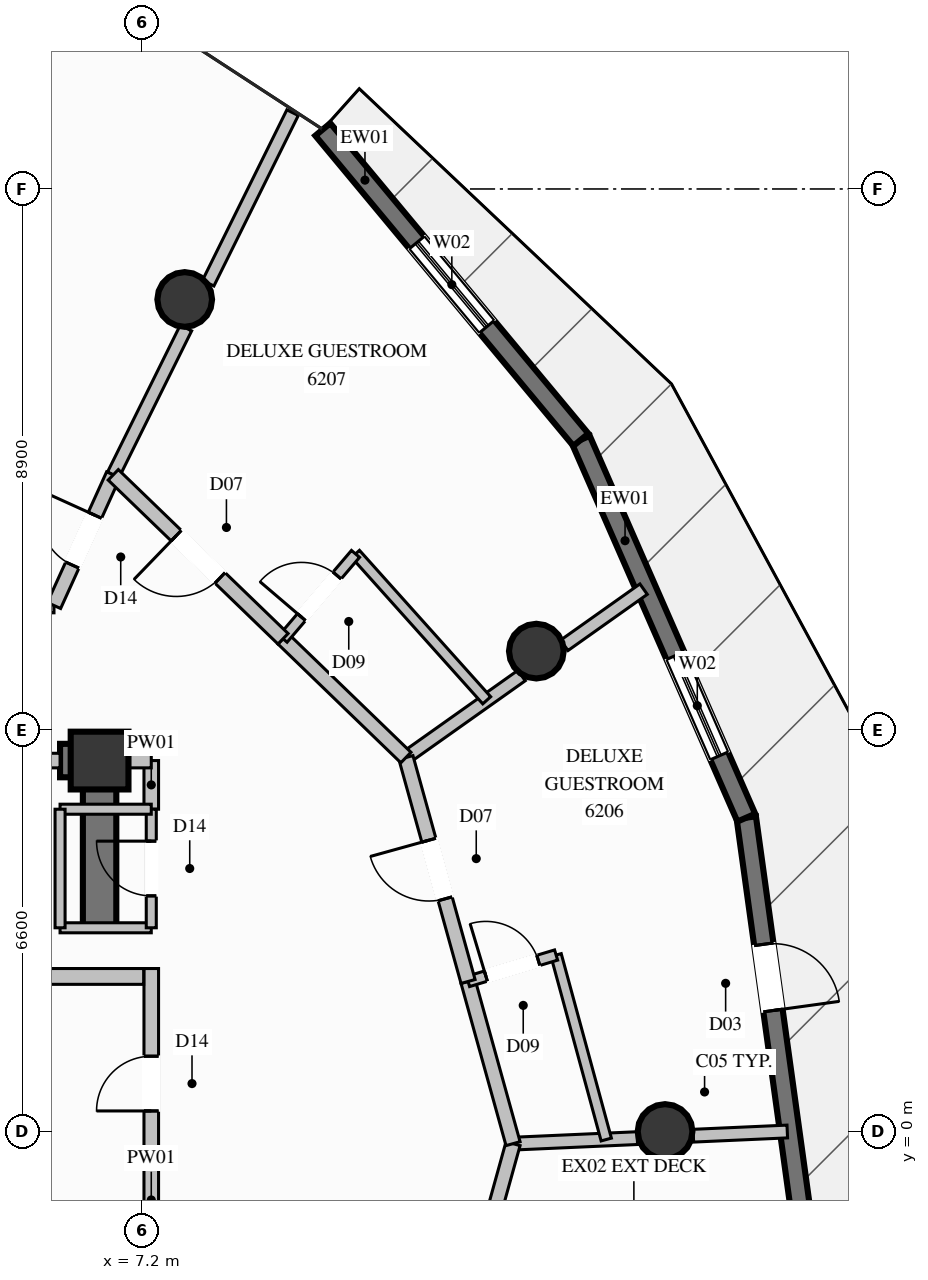
"""IFC4 building model, lengths in metres.
Left out: names, types, materials, properties, quantities, classifications, styles, units other than length and angle.
Written with IfcOpenShell. Run it as: python <this file> out.ifc"""

import sys

from ifc_helpers import new_model, si_unit, direction, frame, frame_2d, origin, origin_2d, place, context, subcontext, project, spatial, rectangle, circle, extrude, element, fill, save


model = new_model("IFC4")
c1 = context("Model", 3, precision=1e-05, world=origin(), true_north=direction((0.0, 1.0)))
c2 = subcontext(c1, "Body", "Model", "MODEL_VIEW")
j1 = project(units=[si_unit("LENGTHUNIT", "METRE"), si_unit("PLANEANGLEUNIT", "RADIAN")], contexts=[c1])
p1 = place(None, origin())
s1 = spatial("IfcSite", under=j1, at=p1, CompositionType="ELEMENT")
p2 = place(p1, origin())
s2 = spatial("IfcBuilding", under=s1, at=p2, CompositionType="ELEMENT")
p3 = place(p2, frame((0.0, 0.0, 230.8)))
s3 = spatial("IfcBuildingStorey", under=s2, at=p3, CompositionType="ELEMENT", Elevation=230.8)
p4 = place(p3, frame((6.5, 6.1, 0.0), z_axis=(0.0, 0.0, 1.0), x_axis=(1.0, 0.0, 0.0)))
e1 = element("IfcColumn", 1, at=p4, inside=s3, PredefinedType="COLUMN", context=c2, shape_type="SweptSolid", body=[
    extrude(rectangle(XDim=0.95, YDim=0.95, at=origin_2d()), origin(), (0.0, 0.0, 1.0), 3.6),
])
p5 = place(p3, frame((5.85, 6.1, 0.0), z_axis=(0.0, 0.0, 1.0), x_axis=(1.0, 0.0, 0.0)))
e2 = element("IfcWall", 2, at=p5, inside=s3, PredefinedType="SHEAR", context=c2, shape_type="SweptSolid", body=[
    extrude(rectangle(XDim=0.375, YDim=0.55, at=frame_2d((0.188, 0.0))), origin(), (0.0, 0.0, 1.0), 3.6),
])
p6 = place(p3, frame((6.5, 3.35, 0.0), z_axis=(0.0, 0.0, 1.0), x_axis=(0.0, 1.0, 0.0)))
e3 = element("IfcWall", 3, at=p6, inside=s3, PredefinedType="SHEAR", context=c2, shape_type="SweptSolid", body=[
    extrude(rectangle(XDim=3.025, YDim=0.55, at=frame_2d((1.512, 0.0))), origin(), (0.0, 0.0, 1.0), 3.6),
])
for number, where, z_axis, x_axis in (
    (4, (15.8, 0.0, 0.0), (0.0, 0.0, 1.0), (1.0, 0.0, 0.0)),
    (5, (13.683, 7.9, 0.0), (0.0, 0.0, 1.0), (1.0, 0.0, 0.0)),
    (6, (7.9, 13.683, 0.0), (0.0, 0.0, 1.0), (1.0, 0.0, 0.0)),
):
    element("IfcColumn", number, at=place(p3, frame(where, z_axis=z_axis, x_axis=x_axis)), inside=s3, PredefinedType="COLUMN", context=c2, shape_type="SweptSolid", body=[
        extrude(circle(Radius=0.45, at=origin_2d()), origin(), (0.0, 0.0, 1.0), 3.6),
    ])
p7 = place(p3, frame((17.136, 5.161, 0.0), z_axis=(0.0, 0.0, 1.0), x_axis=(0.137057460959, -0.990563098644, 0.0)))
e7 = element("IfcWall", 7, at=p7, inside=s3, PredefinedType="SOLIDWALL", context=c2, shape_type="SweptSolid", body=[
    extrude(rectangle(XDim=6.785, YDim=0.32, at=frame_2d((3.393, 0.0))), origin(), (0.0, 0.0, 1.0), 3.2),
])
p8 = place(p7, frame((2.102, 0.0, 0.0)))
e8 = element("IfcOpeningElement", 8, at=p8, cuts=e7, PredefinedType="OPENING", context=c2, shape_type="SweptSolid", body=[
    extrude(rectangle(XDim=1.1, YDim=2.2, at=frame_2d((0.55, 1.1))), frame((0.0, 0.17, 0.0), z_axis=(0.0, -1.0, 0.0), x_axis=(1.0, 0.0, 0.0)), (0.0, 0.0, 1.0), 0.34),
])
p9 = place(p3, frame((14.415, 11.376, 0.0), z_axis=(0.0, 0.0, 1.0), x_axis=(0.401047234641, -0.916057375707, 0.0)))
e9 = element("IfcWall", 9, at=p9, inside=s3, PredefinedType="SOLIDWALL", context=c2, shape_type="SweptSolid", body=[
    extrude(rectangle(XDim=6.785, YDim=0.32, at=frame_2d((3.392, 0.0))), origin(), (0.0, 0.0, 1.0), 3.2),
])
p10 = place(p9, frame((3.875, 0.0, 0.35)))
e10 = element("IfcOpeningElement", 10, at=p10, cuts=e9, PredefinedType="OPENING", context=c2, shape_type="SweptSolid", body=[
    extrude(rectangle(XDim=1.8, YDim=2.6, at=frame_2d((0.9, 1.3))), frame((0.0, 0.17, 0.0), z_axis=(0.0, -1.0, 0.0), x_axis=(1.0, 0.0, 0.0)), (0.0, 0.0, 1.0), 0.34),
])
p11 = place(p3, frame((10.171, 16.479, 0.0), z_axis=(0.0, 0.0, 1.0), x_axis=(0.639438786748, -0.76884201108, 0.0)))
e11 = element("IfcWall", 11, at=p11, inside=s3, PredefinedType="SOLIDWALL", context=c2, shape_type="SweptSolid", body=[
    extrude(rectangle(XDim=6.637, YDim=0.32, at=frame_2d((3.319, 0.0))), origin(), (0.0, 0.0, 1.0), 3.2),
])
p12 = place(p11, frame((2.419, 0.0, 0.35)))
e12 = element("IfcOpeningElement", 12, at=p12, cuts=e11, PredefinedType="OPENING", context=c2, shape_type="SweptSolid", body=[
    extrude(rectangle(XDim=1.8, YDim=2.6, at=frame_2d((0.9, 1.3))), frame((0.0, 0.17, 0.0), z_axis=(0.0, -1.0, 0.0), x_axis=(1.0, 0.0, 0.0)), (0.0, 0.0, 1.0), 0.34),
])
p13 = place(p3, frame((7.35, -2.34, 0.0), z_axis=(0.0, 0.0, 1.0), x_axis=(0.0, 1.0, 0.0)))
e13 = element("IfcWall", 13, at=p13, inside=s3, PredefinedType="PARTITIONING", context=c2, shape_type="SweptSolid", body=[
    extrude(rectangle(XDim=5.02, YDim=0.24, at=frame_2d((2.51, 0.0))), origin(), (0.0, 0.0, 1.0), 3.2),
])
p14 = place(p13, frame((2.678, 0.0, 0.0)))
e14 = element("IfcOpeningElement", 14, at=p14, cuts=e13, PredefinedType="OPENING", context=c2, shape_type="SweptSolid", body=[
    extrude(rectangle(XDim=0.9, YDim=2.02, at=frame_2d((0.45, 1.01))), frame((0.0, 0.13, 0.0), z_axis=(0.0, -1.0, 0.0), x_axis=(1.0, 0.0, 0.0)), (0.0, 0.0, 1.0), 0.26),
])
p15 = place(p3, frame((4.13, 2.55, 0.0), z_axis=(0.0, 0.0, 1.0), x_axis=(1.0, 0.0, 0.0)))
e15 = element("IfcWall", 15, at=p15, inside=s3, PredefinedType="PARTITIONING", context=c2, shape_type="SweptSolid", body=[
    extrude(rectangle(XDim=3.095, YDim=0.26, at=frame_2d((1.548, 0.0))), origin(), (0.0, 0.0, 1.0), 3.2),
])
p16 = place(p3, frame((-7.35, 8.65, 0.0), z_axis=(0.0, 0.0, 1.0), x_axis=(1.0, 0.0, 0.0)))
e16 = element("IfcWall", 16, at=p16, inside=s3, PredefinedType="PARTITIONING", context=c2, shape_type="SweptSolid", body=[
    extrude(rectangle(XDim=13.1, YDim=0.24, at=frame_2d((6.55, 0.0))), origin(), (0.0, 0.0, 1.0), 3.2),
])
p17 = place(p3, frame((3.0, 6.1, 0.0), z_axis=(0.0, 0.0, 1.0), x_axis=(1.0, 0.0, 0.0)))
e17 = element("IfcWall", 17, at=p17, inside=s3, PredefinedType="PARTITIONING", context=c2, shape_type="SweptSolid", body=[
    extrude(rectangle(XDim=2.85, YDim=0.24, at=frame_2d((1.425, 0.0))), origin(), (0.0, 0.0, 1.0), 2.067),
])
p18 = place(p3, frame((7.35, 5.3, 0.0), z_axis=(0.0, 0.0, 1.0), x_axis=(0.0, 1.0, 0.0)))
e18 = element("IfcWall", 18, at=p18, inside=s3, PredefinedType="PARTITIONING", context=c2, shape_type="SweptSolid", body=[
    extrude(rectangle(XDim=0.8, YDim=0.24, at=frame_2d((0.4, 0.0))), origin(), (0.0, 0.0, 1.0), 3.2),
])
p19 = place(p3, frame((6.5, 6.1, 0.0), z_axis=(0.0, 0.0, 1.0), x_axis=(1.0, 0.0, 0.0)))
e19 = element("IfcWall", 19, at=p19, inside=s3, PredefinedType="PARTITIONING", context=c2, shape_type="SweptSolid", body=[
    extrude(rectangle(XDim=0.85, YDim=0.24, at=frame_2d((0.425, 0.0))), origin(), (0.0, 0.0, 1.0), 3.2),
])
p20 = place(p3, frame((5.85, 3.35, 0.0), z_axis=(0.0, 0.0, 1.0), x_axis=(1.0, 0.0, 0.0)))
e20 = element("IfcWall", 20, at=p20, inside=s3, PredefinedType="PARTITIONING", context=c2, shape_type="SweptSolid", body=[
    extrude(rectangle(XDim=1.5, YDim=0.165, at=frame_2d((0.75, 0.0))), origin(), (0.0, 0.0, 1.0), 3.2),
])
p21 = place(p3, frame((7.35, 3.35, 0.0), z_axis=(0.0, 0.0, 1.0), x_axis=(0.0, 1.0, 0.0)))
e21 = element("IfcWall", 21, at=p21, inside=s3, PredefinedType="PARTITIONING", context=c2, shape_type="SweptSolid", body=[
    extrude(rectangle(XDim=1.95, YDim=0.165, at=frame_2d((0.975, 0.0))), origin(), (0.0, 0.0, 1.0), 3.2),
])
p22 = place(p21, frame((0.525, 0.0, 0.0)))
e22 = element("IfcOpeningElement", 22, at=p22, cuts=e21, PredefinedType="OPENING", context=c2, shape_type="SweptSolid", body=[
    extrude(rectangle(XDim=0.9, YDim=2.02, at=frame_2d((0.45, 1.01))), frame((0.0, 0.093, 0.0), z_axis=(0.0, -1.0, 0.0), x_axis=(1.0, 0.0, 0.0)), (0.0, 0.0, 1.0), 0.185),
])
p23 = place(p3, frame((7.35, 5.3, 0.0), z_axis=(0.0, 0.0, 1.0), x_axis=(-1.0, 0.0, 0.0)))
e23 = element("IfcWall", 23, at=p23, inside=s3, PredefinedType="PARTITIONING", context=c2, shape_type="SweptSolid", body=[
    extrude(rectangle(XDim=1.5, YDim=0.165, at=frame_2d((0.75, 0.0))), origin(), (0.0, 0.0, 1.0), 3.2),
])
p24 = place(p3, frame((5.85, 5.3, 0.0), z_axis=(0.0, 0.0, 1.0), x_axis=(0.0, -1.0, 0.0)))
e24 = element("IfcWall", 24, at=p24, inside=s3, PredefinedType="PARTITIONING", context=c2, shape_type="SweptSolid", body=[
    extrude(rectangle(XDim=1.95, YDim=0.165, at=frame_2d((0.975, 0.0))), origin(), (0.0, 0.0, 1.0), 2.067),
])
p25 = place(p3, frame((13.3, -0.2, 0.0), z_axis=(0.0, 0.0, 1.0), x_axis=(0.99900803182, 0.044530353235, 0.0)))
e25 = element("IfcWall", 25, at=p25, inside=s3, PredefinedType="PARTITIONING", context=c2, shape_type="SweptSolid", body=[
    extrude(rectangle(XDim=2.045, YDim=0.21, at=frame_2d((1.022, 0.0))), origin(), (0.0, 0.0, 1.0), 2.067),
])
p26 = place(p3, frame((16.265, -0.069, 0.0), z_axis=(0.0, 0.0, 1.0), x_axis=(0.99900178974, 0.04467017009, 0.0)))
e26 = element("IfcWall", 26, at=p26, inside=s3, PredefinedType="PARTITIONING", context=c2, shape_type="SweptSolid", body=[
    extrude(rectangle(XDim=1.547, YDim=0.21, at=frame_2d((0.773, 0.0))), origin(), (0.0, 0.0, 1.0), 3.2),
])
p27 = place(p3, frame((11.538, 6.15, 0.0), z_axis=(0.0, 0.0, 1.0), x_axis=(0.815822726153, 0.578302065959, 0.0)))
e27 = element("IfcWall", 27, at=p27, inside=s3, PredefinedType="PARTITIONING", context=c2, shape_type="SweptSolid", body=[
    extrude(rectangle(XDim=2.331, YDim=0.21, at=frame_2d((1.166, 0.0))), origin(), (0.0, 0.0, 1.0), 2.067),
])
p28 = place(p3, frame((14.143, 7.995, 0.0), z_axis=(0.0, 0.0, 1.0), x_axis=(0.815967429622, 0.57809787562, 0.0)))
e28 = element("IfcWall", 28, at=p28, inside=s3, PredefinedType="PARTITIONING", context=c2, shape_type="SweptSolid", body=[
    extrude(rectangle(XDim=1.598, YDim=0.21, at=frame_2d((0.799, 0.0))), origin(), (0.0, 0.0, 1.0), 3.2),
])
p29 = place(p3, frame((6.725, 10.799, 0.0), z_axis=(0.0, 0.0, 1.0), x_axis=(0.443620421332, 0.896214774358, 0.0)))
e29 = element("IfcWall", 29, at=p29, inside=s3, PredefinedType="PARTITIONING", context=c2, shape_type="SweptSolid", body=[
    extrude(rectangle(XDim=2.693, YDim=0.21, at=frame_2d((1.347, 0.0))), origin(), (0.0, 0.0, 1.0), 2.067),
])
p30 = place(p3, frame((8.286, 13.951, 0.0), z_axis=(0.0, 0.0, 1.0), x_axis=(0.443683126351, 0.896183733054, 0.0)))
e30 = element("IfcWall", 30, at=p30, inside=s3, PredefinedType="PARTITIONING", context=c2, shape_type="SweptSolid", body=[
    extrude(rectangle(XDim=3.129, YDim=0.21, at=frame_2d((1.564, 0.0))), origin(), (0.0, 0.0, 1.0), 3.2),
])
p31 = place(p3, frame((5.75, 8.65, 0.0), z_axis=(0.0, 0.0, 1.0), x_axis=(0.413171528251, 0.910653220629, 0.0)))
e31 = element("IfcWall", 31, at=p31, inside=s3, PredefinedType="PARTITIONING", context=c2, shape_type="SweptSolid", body=[
    extrude(rectangle(XDim=2.36, YDim=0.24, at=frame_2d((1.18, 0.0))), origin(), (0.0, 0.0, 1.0), 2.067),
])
p32 = place(p31, frame((0.73, 0.0, 0.0)))
e32 = element("IfcOpeningElement", 32, at=p32, cuts=e31, PredefinedType="OPENING", context=c2, shape_type="SweptSolid", body=[
    extrude(rectangle(XDim=0.9, YDim=2.02, at=frame_2d((0.45, 1.01))), frame((0.0, 0.13, 0.0), z_axis=(0.0, -1.0, 0.0), x_axis=(1.0, 0.0, 0.0)), (0.0, 0.0, 1.0), 0.26),
])
p33 = place(p3, frame((12.278, -3.883, 0.0), z_axis=(0.0, 0.0, 1.0), x_axis=(0.267373718537, 0.963592909187, 0.0)))
e33 = element("IfcWall", 33, at=p33, inside=s3, PredefinedType="PARTITIONING", context=c2, shape_type="SweptSolid", body=[
    extrude(rectangle(XDim=3.822, YDim=0.24, at=frame_2d((1.911, 0.0))), origin(), (0.0, 0.0, 1.0), 3.2),
])
p34 = place(p33, frame((1.411, 0.0, 0.0)))
e34 = element("IfcOpeningElement", 34, at=p34, cuts=e33, PredefinedType="OPENING", context=c2, shape_type="SweptSolid", body=[
    extrude(rectangle(XDim=1.0, YDim=2.2, at=frame_2d((0.5, 1.1))), frame((0.0, 0.13, 0.0), z_axis=(0.0, -1.0, 0.0), x_axis=(1.0, 0.0, 0.0)), (0.0, 0.0, 1.0), 0.26),
])
p35 = place(p3, frame((13.3, -0.2, 0.0), z_axis=(0.0, 0.0, 1.0), x_axis=(-0.267361785392, 0.963596220266, 0.0)))
e35 = element("IfcWall", 35, at=p35, inside=s3, PredefinedType="PARTITIONING", context=c2, shape_type="SweptSolid", body=[
    extrude(rectangle(XDim=2.768, YDim=0.24, at=frame_2d((1.384, 0.0))), origin(), (0.0, 0.0, 1.0), 3.2),
])
p36 = place(p3, frame((14.833, -0.132, 0.0), z_axis=(0.0, 0.0, 1.0), x_axis=(-0.262361781469, 0.964969582746, 0.0)))
e36 = element("IfcWall", 36, at=p36, inside=s3, PredefinedType="PLUMBINGWALL", context=c2, shape_type="SweptSolid", body=[
    extrude(rectangle(XDim=3.144, YDim=0.175, at=frame_2d((1.572, 0.0))), origin(), (0.0, 0.0, 1.0), 3.2),
])
p37 = place(p3, frame((12.56, 2.467, 0.0), z_axis=(0.0, 0.0, 1.0), x_axis=(0.957706206775, 0.287747843614, 0.0)))
e37 = element("IfcWall", 37, at=p37, inside=s3, PredefinedType="PLUMBINGWALL", context=c2, shape_type="SweptSolid", body=[
    extrude(rectangle(XDim=1.512, YDim=0.175, at=frame_2d((0.756, 0.0))), origin(), (0.0, 0.0, 1.0), 3.2),
])
p38 = place(p37, frame((0.306, 0.0, 0.0)))
e38 = element("IfcOpeningElement", 38, at=p38, cuts=e37, PredefinedType="OPENING", context=c2, shape_type="SweptSolid", body=[
    extrude(rectangle(XDim=0.9, YDim=2.1, at=frame_2d((0.45, 1.05))), frame((0.0, 0.098, 0.0), z_axis=(0.0, -1.0, 0.0), x_axis=(1.0, 0.0, 0.0)), (0.0, 0.0, 1.0), 0.195),
])
p39 = place(p3, frame((12.56, 2.467, 0.0), z_axis=(0.0, 0.0, 1.0), x_axis=(-0.267390175797, 0.963588342544, 0.0)))
e39 = element("IfcWall", 39, at=p39, inside=s3, PredefinedType="PARTITIONING", context=c2, shape_type="SweptSolid", body=[
    extrude(rectangle(XDim=3.822, YDim=0.24, at=frame_2d((1.911, 0.0))), origin(), (0.0, 0.0, 1.0), 3.2),
])
p40 = place(p39, frame((1.411, 0.0, 0.0)))
e40 = element("IfcOpeningElement", 40, at=p40, cuts=e39, PredefinedType="OPENING", context=c2, shape_type="SweptSolid", body=[
    extrude(rectangle(XDim=1.0, YDim=2.2, at=frame_2d((0.5, 1.1))), frame((0.0, 0.13, 0.0), z_axis=(0.0, -1.0, 0.0), x_axis=(1.0, 0.0, 0.0)), (0.0, 0.0, 1.0), 0.26),
])
p41 = place(p3, frame((11.538, 6.15, 0.0), z_axis=(0.0, 0.0, 1.0), x_axis=(-0.719078080202, 0.694929287463, 0.0)))
e41 = element("IfcWall", 41, at=p41, inside=s3, PredefinedType="PARTITIONING", context=c2, shape_type="SweptSolid", body=[
    extrude(rectangle(XDim=2.811, YDim=0.24, at=frame_2d((1.405, 0.0))), origin(), (0.0, 0.0, 1.0), 3.2),
])
p42 = place(p3, frame((12.867, 7.091, 0.0), z_axis=(0.0, 0.0, 1.0), x_axis=(-0.667390556652, 0.744707892325, 0.0)))
e42 = element("IfcWall", 42, at=p42, inside=s3, PredefinedType="PLUMBINGWALL", context=c2, shape_type="SweptSolid", body=[
    extrude(rectangle(XDim=3.233, YDim=0.175, at=frame_2d((1.617, 0.0))), origin(), (0.0, 0.0, 1.0), 3.2),
])
p43 = place(p3, frame((9.517, 8.103, 0.0), z_axis=(0.0, 0.0, 1.0), x_axis=(0.649322426224, 0.760513239071, 0.0)))
e43 = element("IfcWall", 43, at=p43, inside=s3, PredefinedType="PLUMBINGWALL", context=c2, shape_type="SweptSolid", body=[
    extrude(rectangle(XDim=1.836, YDim=0.175, at=frame_2d((0.918, 0.0))), origin(), (0.0, 0.0, 1.0), 3.2),
])
p44 = place(p43, frame((0.468, 0.0, 0.0)))
e44 = element("IfcOpeningElement", 44, at=p44, cuts=e43, PredefinedType="OPENING", context=c2, shape_type="SweptSolid", body=[
    extrude(rectangle(XDim=0.9, YDim=2.1, at=frame_2d((0.45, 1.05))), frame((0.0, 0.098, 0.0), z_axis=(0.0, -1.0, 0.0), x_axis=(1.0, 0.0, 0.0)), (0.0, 0.0, 1.0), 0.195),
])
p45 = place(p3, frame((9.517, 8.103, 0.0), z_axis=(0.0, 0.0, 1.0), x_axis=(-0.719359188441, 0.694638292931, 0.0)))
e45 = element("IfcWall", 45, at=p45, inside=s3, PredefinedType="PARTITIONING", context=c2, shape_type="SweptSolid", body=[
    extrude(rectangle(XDim=3.881, YDim=0.24, at=frame_2d((1.94, 0.0))), origin(), (0.0, 0.0, 1.0), 3.2),
])
p46 = place(p45, frame((1.441, 0.0, 0.0)))
e46 = element("IfcOpeningElement", 46, at=p46, cuts=e45, PredefinedType="OPENING", context=c2, shape_type="SweptSolid", body=[
    extrude(rectangle(XDim=1.0, YDim=2.2, at=frame_2d((0.5, 1.1))), frame((0.0, 0.13, 0.0), z_axis=(0.0, -1.0, 0.0), x_axis=(1.0, 0.0, 0.0)), (0.0, 0.0, 1.0), 0.26),
])
p47 = place(p8, origin())
e47 = element("IfcDoor", 47, at=p47, inside=s3, OperationType="SINGLE_SWING_RIGHT", PredefinedType="DOOR", context=c2, shape_type="SweptSolid", body=[
    extrude(rectangle(XDim=1.1, YDim=2.2, at=frame_2d((0.55, 1.1))), frame((0.0, 0.025, 0.0), z_axis=(0.0, -1.0, 0.0), x_axis=(1.0, 0.0, 0.0)), (0.0, 0.0, 1.0), 0.05),
])
fill(e8, e47)
p48 = place(p10, origin())
e48 = element("IfcWindow", 48, at=p48, inside=s3, PartitioningType="SINGLE_PANEL", PredefinedType="WINDOW", context=c2, shape_type="SweptSolid", body=[
    extrude(rectangle(XDim=1.8, YDim=2.6, at=frame_2d((0.9, 1.3))), frame((0.0, 0.03, 0.0), z_axis=(0.0, -1.0, 0.0), x_axis=(1.0, 0.0, 0.0)), (0.0, 0.0, 1.0), 0.06),
])
fill(e10, e48)
p49 = place(p12, origin())
e49 = element("IfcWindow", 49, at=p49, inside=s3, PartitioningType="SINGLE_PANEL", PredefinedType="WINDOW", context=c2, shape_type="SweptSolid", body=[
    extrude(rectangle(XDim=1.8, YDim=2.6, at=frame_2d((0.9, 1.3))), frame((0.0, 0.03, 0.0), z_axis=(0.0, -1.0, 0.0), x_axis=(1.0, 0.0, 0.0)), (0.0, 0.0, 1.0), 0.06),
])
fill(e12, e49)
p50 = place(p14, origin())
e50 = element("IfcDoor", 50, at=p50, inside=s3, OperationType="SINGLE_SWING_LEFT", PredefinedType="DOOR", context=c2, shape_type="SweptSolid", body=[
    extrude(rectangle(XDim=0.9, YDim=2.02, at=frame_2d((0.45, 1.01))), frame((0.0, 0.025, 0.0), z_axis=(0.0, -1.0, 0.0), x_axis=(1.0, 0.0, 0.0)), (0.0, 0.0, 1.0), 0.05),
])
fill(e14, e50)
p51 = place(p22, origin())
e51 = element("IfcDoor", 51, at=p51, inside=s3, OperationType="SINGLE_SWING_RIGHT", PredefinedType="DOOR", context=c2, shape_type="SweptSolid", body=[
    extrude(rectangle(XDim=0.9, YDim=2.02, at=frame_2d((0.45, 1.01))), frame((0.0, 0.025, 0.0), z_axis=(0.0, -1.0, 0.0), x_axis=(1.0, 0.0, 0.0)), (0.0, 0.0, 1.0), 0.05),
])
fill(e22, e51)
p52 = place(p32, origin())
e52 = element("IfcDoor", 52, at=p52, inside=s3, OperationType="SINGLE_SWING_RIGHT", PredefinedType="DOOR", context=c2, shape_type="SweptSolid", body=[
    extrude(rectangle(XDim=0.9, YDim=2.02, at=frame_2d((0.45, 1.01))), frame((0.0, 0.025, 0.0), z_axis=(0.0, -1.0, 0.0), x_axis=(1.0, 0.0, 0.0)), (0.0, 0.0, 1.0), 0.05),
])
fill(e32, e52)
p53 = place(p38, origin())
e53 = element("IfcDoor", 53, at=p53, inside=s3, OperationType="SINGLE_SWING_LEFT", PredefinedType="DOOR", context=c2, shape_type="SweptSolid", body=[
    extrude(rectangle(XDim=0.9, YDim=2.1, at=frame_2d((0.45, 1.05))), frame((0.0, 0.025, 0.0), z_axis=(0.0, -1.0, 0.0), x_axis=(1.0, 0.0, 0.0)), (0.0, 0.0, 1.0), 0.05),
])
fill(e38, e53)
p54 = place(p40, origin())
e54 = element("IfcDoor", 54, at=p54, inside=s3, OperationType="SINGLE_SWING_RIGHT", PredefinedType="DOOR", context=c2, shape_type="SweptSolid", body=[
    extrude(rectangle(XDim=1.0, YDim=2.2, at=frame_2d((0.5, 1.1))), frame((0.0, 0.025, 0.0), z_axis=(0.0, -1.0, 0.0), x_axis=(1.0, 0.0, 0.0)), (0.0, 0.0, 1.0), 0.05),
])
fill(e40, e54)
p55 = place(p44, origin())
e55 = element("IfcDoor", 55, at=p55, inside=s3, OperationType="SINGLE_SWING_LEFT", PredefinedType="DOOR", context=c2, shape_type="SweptSolid", body=[
    extrude(rectangle(XDim=0.9, YDim=2.1, at=frame_2d((0.45, 1.05))), frame((0.0, 0.025, 0.0), z_axis=(0.0, -1.0, 0.0), x_axis=(1.0, 0.0, 0.0)), (0.0, 0.0, 1.0), 0.05),
])
fill(e44, e55)
p56 = place(p46, origin())
e56 = element("IfcDoor", 56, at=p56, inside=s3, OperationType="SINGLE_SWING_RIGHT", PredefinedType="DOOR", context=c2, shape_type="SweptSolid", body=[
    extrude(rectangle(XDim=1.0, YDim=2.2, at=frame_2d((0.5, 1.1))), frame((0.0, 0.025, 0.0), z_axis=(0.0, -1.0, 0.0), x_axis=(1.0, 0.0, 0.0)), (0.0, 0.0, 1.0), 0.05),
])
fill(e46, e56)
save(model, sys.argv[1])
